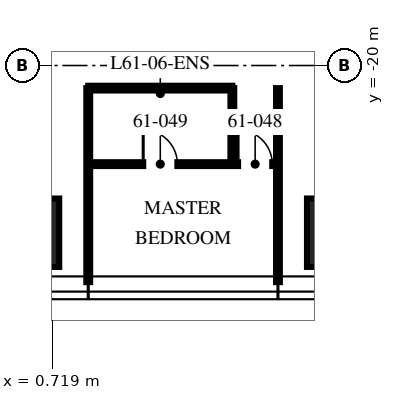
"""IFC4 building model, lengths in metres.
Left out: names, types, materials, properties, quantities, classifications, styles, units other than length and angle.
Written with IfcOpenShell. Run it as: python <this file> out.ifc"""

import sys

from ifc_helpers import new_model, si_unit, direction, frame, frame_2d, origin, origin_2d, place, context, subcontext, project, spatial, rectangle, extrude, element, fill, save


model = new_model("IFC4")
c1 = context("Model", 3, precision=1e-05, world=origin(), true_north=direction((0.0, 1.0)))
c2 = subcontext(c1, "Body", "Model", "MODEL_VIEW")
j1 = project(units=[si_unit("LENGTHUNIT", "METRE"), si_unit("PLANEANGLEUNIT", "RADIAN")], contexts=[c1])
p1 = place(None, origin())
s1 = spatial("IfcSite", under=j1, at=p1, CompositionType="ELEMENT")
p2 = place(p1, origin())
s2 = spatial("IfcBuilding", under=s1, at=p2, CompositionType="ELEMENT")
p3 = place(p2, frame((0.0, 0.0, 244.5)))
s3 = spatial("IfcBuildingStorey", under=s2, at=p3, CompositionType="ELEMENT", Elevation=244.5)
for number, where, z_axis, x_axis in (
    (1, (8.32, -24.4, 0.0), (0.0, 0.0, 1.0), (1.0, 0.0, 0.0)),
    (2, (0.0, -24.4, 0.0), (0.0, 0.0, 1.0), (1.0, 0.0, 0.0)),
):
    element("IfcColumn", number, at=place(p3, frame(where, z_axis=z_axis, x_axis=x_axis)), inside=s3, PredefinedType="COLUMN", context=c2, shape_type="SweptSolid", body=[
        extrude(rectangle(XDim=1.8, YDim=1.8, at=origin_2d()), origin(), (0.0, 0.0, 1.0), 3.75),
    ])
for number, where, z_axis, x_axis in (
    (3, (1.664, -20.595, 0.0), (0.0, 0.0, 1.0), (0.0, -1.0, 0.0)),
    (4, (6.656, -20.595, 0.0), (0.0, 0.0, 1.0), (0.0, -1.0, 0.0)),
):
    element("IfcWall", number, at=place(p3, frame(where, z_axis=z_axis, x_axis=x_axis)), inside=s3, PredefinedType="PARTITIONING", context=c2, shape_type="SweptSolid", body=[
        extrude(rectangle(XDim=5.105, YDim=0.1, at=frame_2d((2.552, 0.0))), origin(), (0.0, 0.0, 1.0), 2.91),
    ])
p4 = place(p3, frame((1.664, -22.595, 0.0), z_axis=(0.0, 0.0, 1.0), x_axis=(1.0, 0.0, 0.0)))
e5 = element("IfcWall", 5, at=p4, inside=s3, PredefinedType="PARTITIONING", context=c2, shape_type="SweptSolid", body=[
    extrude(rectangle(XDim=4.992, YDim=0.1, at=frame_2d((2.496, 0.0))), origin(), (0.0, 0.0, 1.0), 2.81),
])
p5 = place(p4, frame((3.942, 0.0, 0.0)))
e6 = element("IfcOpeningElement", 6, at=p5, cuts=e5, PredefinedType="OPENING", context=c2, shape_type="SweptSolid", body=[
    extrude(rectangle(XDim=0.9, YDim=2.1, at=frame_2d((0.45, 1.05))), frame((0.0, 0.06, 0.0), z_axis=(0.0, -1.0, 0.0), x_axis=(1.0, 0.0, 0.0)), (0.0, 0.0, 1.0), 0.12),
])
p6 = place(p4, frame((1.446, 0.0, 0.0)))
e7 = element("IfcOpeningElement", 7, at=p6, cuts=e5, PredefinedType="OPENING", context=c2, shape_type="SweptSolid", body=[
    extrude(rectangle(XDim=0.9, YDim=2.1, at=frame_2d((0.45, 1.05))), frame((0.0, 0.06, 0.0), z_axis=(0.0, -1.0, 0.0), x_axis=(1.0, 0.0, 0.0)), (0.0, 0.0, 1.0), 0.12),
])
p7 = place(p3, frame((5.456, -20.595, 0.0), z_axis=(0.0, 0.0, 1.0), x_axis=(0.0, -1.0, 0.0)))
e8 = element("IfcWall", 8, at=p7, inside=s3, PredefinedType="PARTITIONING", context=c2, shape_type="SweptSolid", body=[
    extrude(rectangle(XDim=2.0, YDim=0.1, at=frame_2d((1.0, 0.0))), origin(), (0.0, 0.0, 1.0), 3.5),
])
p8 = place(p3, frame((1.664, -20.595, 0.0), z_axis=(0.0, 0.0, 1.0), x_axis=(1.0, 0.0, 0.0)))
e9 = element("IfcWall", 9, at=p8, inside=s3, PredefinedType="PARTITIONING", context=c2, shape_type="SweptSolid", body=[
    extrude(rectangle(XDim=3.792, YDim=0.125, at=frame_2d((1.896, 0.0))), origin(), (0.0, 0.0, 1.0), 2.81),
])
p9 = place(p5, origin())
e10 = element("IfcDoor", 10, at=p9, inside=s3, OperationType="SINGLE_SWING_LEFT", PredefinedType="DOOR", context=c2, shape_type="SweptSolid", body=[
    extrude(rectangle(XDim=0.9, YDim=2.1, at=frame_2d((0.45, 1.05))), frame((0.0, 0.025, 0.0), z_axis=(0.0, -1.0, 0.0), x_axis=(1.0, 0.0, 0.0)), (0.0, 0.0, 1.0), 0.05),
])
fill(e6, e10)
p10 = place(p6, origin())
e11 = element("IfcDoor", 11, at=p10, inside=s3, OperationType="SINGLE_SWING_LEFT", PredefinedType="DOOR", context=c2, shape_type="SweptSolid", body=[
    extrude(rectangle(XDim=0.9, YDim=2.1, at=frame_2d((0.45, 1.05))), frame((0.0, 0.025, 0.0), z_axis=(0.0, -1.0, 0.0), x_axis=(1.0, 0.0, 0.0)), (0.0, 0.0, 1.0), 0.05),
])
fill(e7, e11)
save(model, sys.argv[1])
